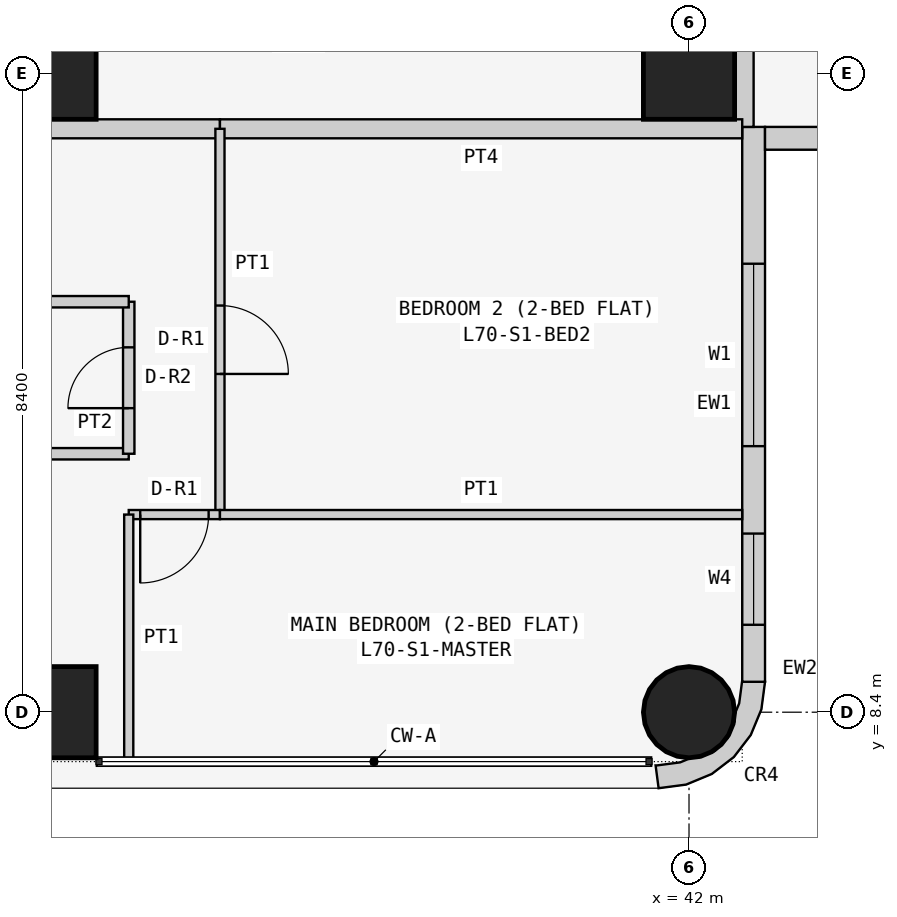
"""IFC4 building model, lengths in metres.
Left out: names, types, materials, properties, quantities, classifications, styles, units other than length and angle.
Written with IfcOpenShell. Run it as: python <this file> out.ifc"""

import sys

from ifc_helpers import new_model, si_unit, direction, frame, frame_2d, origin, origin_2d, place, context, subcontext, project, spatial, polyline, rectangle, circle, outline, extrude, element, fill, save


model = new_model("IFC4")
c1 = context("Model", 3, precision=1e-05, world=origin(), true_north=direction((0.0, 1.0)))
c2 = subcontext(c1, "Body", "Model", "MODEL_VIEW")
j1 = project(units=[si_unit("LENGTHUNIT", "METRE"), si_unit("PLANEANGLEUNIT", "RADIAN")], contexts=[c1])
p1 = place(None, origin())
s1 = spatial("IfcSite", under=j1, at=p1, CompositionType="ELEMENT")
p2 = place(p1, origin())
s2 = spatial("IfcBuilding", under=s1, at=p2, CompositionType="ELEMENT")
p3 = place(p2, frame((0.0, 0.0, 268.5)))
s3 = spatial("IfcBuildingStorey", under=s2, at=p3, CompositionType="ELEMENT", Elevation=268.5)
for number, where, z_axis, x_axis in (
    (1, (33.6, 8.4, 0.0), (0.0, 0.0, 1.0), (1.0, 0.0, 0.0)),
    (2, (33.6, 16.8, 0.0), (0.0, 0.0, 1.0), (1.0, 0.0, 0.0)),
):
    element("IfcColumn", number, at=place(p3, frame(where, z_axis=z_axis, x_axis=x_axis)), inside=s3, PredefinedType="COLUMN", context=c2, shape_type="SweptSolid", body=[
        extrude(rectangle(XDim=1.2, YDim=1.2, at=origin_2d()), origin(), (0.0, 0.0, 1.0), 3.6),
    ])
p4 = place(p3, frame((42.0, 8.4, 0.0), z_axis=(0.0, 0.0, 1.0), x_axis=(1.0, 0.0, 0.0)))
e3 = element("IfcColumn", 3, at=p4, inside=s3, PredefinedType="COLUMN", context=c2, shape_type="SweptSolid", body=[
    extrude(circle(Radius=0.6, at=origin_2d()), origin(), (0.0, 0.0, 1.0), 3.6),
])
p5 = place(p3, frame((42.0, 16.8, 0.0), z_axis=(0.0, 0.0, 1.0), x_axis=(1.0, 0.0, 0.0)))
e4 = element("IfcColumn", 4, at=p5, inside=s3, PredefinedType="COLUMN", context=c2, shape_type="SweptSolid", body=[
    extrude(rectangle(XDim=1.2, YDim=1.2, at=origin_2d()), origin(), (0.0, 0.0, 1.0), 3.6),
])
p6 = place(p3, frame((42.85, 8.8, 0.0), z_axis=(0.0, 0.0, 1.0), x_axis=(0.0, 1.0, 0.0)))
e5 = element("IfcWall", 5, at=p6, inside=s3, PredefinedType="SOLIDWALL", context=c2, shape_type="SweptSolid", body=[
    extrude(rectangle(XDim=7.3, YDim=0.3, at=frame_2d((3.65, 0.0))), origin(), (0.0, 0.0, 1.0), 3.45),
])
p7 = place(p6, frame((3.1, 0.0, 0.9)))
e6 = element("IfcOpeningElement", 6, at=p7, cuts=e5, PredefinedType="OPENING", context=c2, shape_type="SweptSolid", body=[
    extrude(rectangle(XDim=2.4, YDim=1.5, at=frame_2d((1.2, 0.75))), frame((0.0, 0.16, 0.0), z_axis=(0.0, -1.0, 0.0), x_axis=(1.0, 0.0, 0.0)), (0.0, 0.0, 1.0), 0.32),
])
p8 = place(p6, frame((0.75, 0.0, 0.9)))
e7 = element("IfcOpeningElement", 7, at=p8, cuts=e5, PredefinedType="OPENING", context=c2, shape_type="SweptSolid", body=[
    extrude(rectangle(XDim=1.2, YDim=1.5, at=frame_2d((0.6, 0.75))), frame((0.0, 0.16, 0.0), z_axis=(0.0, -1.0, 0.0), x_axis=(1.0, 0.0, 0.0)), (0.0, 0.0, 1.0), 0.32),
])
p9 = place(p3, frame((43.0, 15.95, 0.0), z_axis=(0.0, 0.0, 1.0), x_axis=(1.0, 0.0, 0.0)))
e8 = element("IfcWall", 8, at=p9, inside=s3, PredefinedType="SOLIDWALL", context=c2, shape_type="SweptSolid", body=[
    extrude(rectangle(XDim=7.0, YDim=0.3, at=frame_2d((3.5, 0.0))), origin(), (0.0, 0.0, 1.0), 3.45),
])
p10 = place(p9, frame((1.5, 0.0, 0.9)))
e9 = element("IfcOpeningElement", 9, at=p10, cuts=e8, PredefinedType="OPENING", context=c2, shape_type="SweptSolid", body=[
    extrude(rectangle(XDim=2.4, YDim=1.5, at=frame_2d((1.2, 0.75))), frame((0.0, 0.16, 0.0), z_axis=(0.0, -1.0, 0.0), x_axis=(1.0, 0.0, 0.0)), (0.0, 0.0, 1.0), 0.32),
])
p11 = place(p9, frame((5.05, 0.0, 0.9)))
e10 = element("IfcOpeningElement", 10, at=p11, cuts=e8, PredefinedType="OPENING", context=c2, shape_type="SweptSolid", body=[
    extrude(rectangle(XDim=1.2, YDim=1.5, at=frame_2d((0.6, 0.75))), frame((0.0, 0.16, 0.0), z_axis=(0.0, -1.0, 0.0), x_axis=(1.0, 0.0, 0.0)), (0.0, 0.0, 1.0), 0.32),
])
p12 = place(p3, frame((41.638, 7.824, 0.0), z_axis=(0.0, 0.0, 1.0), x_axis=(0.707106781187, -0.707106781187, 0.0)))
e11 = element("IfcWall", 11, at=p12, inside=s3, PredefinedType="SOLIDWALL", context=c2, shape_type="SweptSolid", body=[
    extrude(outline(polyline([(0.033, 1.469), (0.047, 1.455), (0.233, 1.212), (0.292, 1.069), (0.358, 1.003), (0.449, 0.782), (0.449, 0.543), (0.358, 0.322), (0.292, 0.257), (0.233, 0.114), (0.047, -0.129), (0.033, -0.143), (0.273, -0.327), (0.495, -0.037), (0.635, 0.301), (0.683, 0.663), (0.635, 1.025), (0.495, 1.363), (0.273, 1.653), (0.033, 1.469)])), origin(), (0.0, 0.0, 1.0), 3.45),
])
p13 = place(p3, frame((42.725, 22.971, 0.0), z_axis=(0.0, 0.0, 1.0), x_axis=(0.0, -1.0, 0.0)))
e12 = element("IfcWall", 12, at=p13, inside=s3, PredefinedType="PARTITIONING", context=c2, shape_type="SweptSolid", body=[
    extrude(rectangle(XDim=6.871, YDim=0.25, at=frame_2d((3.436, 0.0))), origin(), (0.0, 0.0, 1.0), 3.45),
])
p14 = place(p3, frame((35.829, 16.075, 0.0), z_axis=(0.0, 0.0, 1.0), x_axis=(-1.0, 0.0, 0.0)))
e13 = element("IfcWall", 13, at=p14, inside=s3, PredefinedType="PARTITIONING", context=c2, shape_type="SweptSolid", body=[
    extrude(rectangle(XDim=6.429, YDim=0.25, at=frame_2d((3.215, 0.0))), origin(), (0.0, 0.0, 1.0), 3.45),
])
p15 = place(p14, frame((4.929, 0.0, 0.0)))
e14 = element("IfcOpeningElement", 14, at=p15, cuts=e13, PredefinedType="OPENING", context=c2, shape_type="SweptSolid", body=[
    extrude(rectangle(XDim=1.0, YDim=2.1, at=frame_2d((0.5, 1.05))), frame((0.0, 0.135, 0.0), z_axis=(0.0, -1.0, 0.0), x_axis=(1.0, 0.0, 0.0)), (0.0, 0.0, 1.0), 0.27),
])
p16 = place(p3, frame((42.7, 16.075, 0.0), z_axis=(0.0, 0.0, 1.0), x_axis=(-1.0, 0.0, 0.0)))
e15 = element("IfcWall", 15, at=p16, inside=s3, PredefinedType="PARTITIONING", context=c2, shape_type="SweptSolid", body=[
    extrude(rectangle(XDim=6.871, YDim=0.25, at=frame_2d((3.436, 0.0))), origin(), (0.0, 0.0, 1.0), 3.45),
])
p17 = place(p3, frame((29.4, 11.8, 0.0), z_axis=(0.0, 0.0, 1.0), x_axis=(1.0, 0.0, 0.0)))
e16 = element("IfcWall", 16, at=p17, inside=s3, PredefinedType="PARTITIONING", context=c2, shape_type="SweptSolid", body=[
    extrude(rectangle(XDim=5.229, YDim=0.15, at=frame_2d((2.615, 0.0))), origin(), (0.0, 0.0, 1.0), 3.45),
])
p18 = place(p3, frame((34.629, 11.8, 0.0), z_axis=(0.0, 0.0, 1.0), x_axis=(0.0, 1.0, 0.0)))
e17 = element("IfcWall", 17, at=p18, inside=s3, PredefinedType="PARTITIONING", context=c2, shape_type="SweptSolid", body=[
    extrude(rectangle(XDim=2.0, YDim=0.15, at=frame_2d((1.0, 0.0))), origin(), (0.0, 0.0, 1.0), 3.45),
])
p19 = place(p18, frame((0.6, 0.0, 0.0)))
e18 = element("IfcOpeningElement", 18, at=p19, cuts=e17, PredefinedType="OPENING", context=c2, shape_type="SweptSolid", body=[
    extrude(rectangle(XDim=0.8, YDim=2.1, at=frame_2d((0.4, 1.05))), frame((0.0, 0.085, 0.0), z_axis=(0.0, -1.0, 0.0), x_axis=(1.0, 0.0, 0.0)), (0.0, 0.0, 1.0), 0.17),
])
p20 = place(p3, frame((34.629, 13.8, 0.0), z_axis=(0.0, 0.0, 1.0), x_axis=(-1.0, 0.0, 0.0)))
e19 = element("IfcWall", 19, at=p20, inside=s3, PredefinedType="PARTITIONING", context=c2, shape_type="SweptSolid", body=[
    extrude(rectangle(XDim=5.229, YDim=0.15, at=frame_2d((2.615, 0.0))), origin(), (0.0, 0.0, 1.0), 3.45),
])
p21 = place(p3, frame((35.829, 16.075, 0.0), z_axis=(0.0, 0.0, 1.0), x_axis=(0.0, -1.0, 0.0)))
e20 = element("IfcWall", 20, at=p21, inside=s3, PredefinedType="PARTITIONING", context=c2, shape_type="SweptSolid", body=[
    extrude(rectangle(XDim=5.075, YDim=0.12, at=frame_2d((2.538, 0.0))), origin(), (0.0, 0.0, 1.0), 3.45),
])
p22 = place(p21, frame((2.325, 0.0, 0.0)))
e21 = element("IfcOpeningElement", 21, at=p22, cuts=e20, PredefinedType="OPENING", context=c2, shape_type="SweptSolid", body=[
    extrude(rectangle(XDim=0.9, YDim=2.1, at=frame_2d((0.45, 1.05))), frame((0.0, 0.07, 0.0), z_axis=(0.0, -1.0, 0.0), x_axis=(1.0, 0.0, 0.0)), (0.0, 0.0, 1.0), 0.14),
])
p23 = place(p3, frame((35.829, 11.0, 0.0), z_axis=(0.0, 0.0, 1.0), x_axis=(-1.0, 0.0, 0.0)))
e22 = element("IfcWall", 22, at=p23, inside=s3, PredefinedType="PARTITIONING", context=c2, shape_type="SweptSolid", body=[
    extrude(rectangle(XDim=1.2, YDim=0.12, at=frame_2d((0.6, 0.0))), origin(), (0.0, 0.0, 1.0), 3.45),
])
p24 = place(p23, frame((0.149, 0.0, 0.0)))
e23 = element("IfcOpeningElement", 23, at=p24, cuts=e22, PredefinedType="OPENING", context=c2, shape_type="SweptSolid", body=[
    extrude(rectangle(XDim=0.9, YDim=2.1, at=frame_2d((0.45, 1.05))), frame((0.0, 0.07, 0.0), z_axis=(0.0, -1.0, 0.0), x_axis=(1.0, 0.0, 0.0)), (0.0, 0.0, 1.0), 0.14),
])
p25 = place(p3, frame((34.629, 11.0, 0.0), z_axis=(0.0, 0.0, 1.0), x_axis=(0.0, -1.0, 0.0)))
e24 = element("IfcWall", 24, at=p25, inside=s3, PredefinedType="PARTITIONING", context=c2, shape_type="SweptSolid", body=[
    extrude(rectangle(XDim=3.25, YDim=0.12, at=frame_2d((1.625, 0.0))), origin(), (0.0, 0.0, 1.0), 3.45),
])
p26 = place(p3, frame((35.829, 11.0, 0.0), z_axis=(0.0, 0.0, 1.0), x_axis=(1.0, 0.0, 0.0)))
e25 = element("IfcWall", 25, at=p26, inside=s3, PredefinedType="PARTITIONING", context=c2, shape_type="SweptSolid", body=[
    extrude(rectangle(XDim=6.871, YDim=0.12, at=frame_2d((3.436, 0.0))), origin(), (0.0, 0.0, 1.0), 3.45),
])
p27 = place(p7, origin())
e26 = element("IfcWindow", 26, at=p27, inside=s3, PartitioningType="SINGLE_PANEL", PredefinedType="WINDOW", context=c2, shape_type="SweptSolid", body=[
    extrude(rectangle(XDim=2.4, YDim=1.5, at=frame_2d((1.2, 0.75))), frame((0.0, 0.03, 0.0), z_axis=(0.0, -1.0, 0.0), x_axis=(1.0, 0.0, 0.0)), (0.0, 0.0, 1.0), 0.06),
])
fill(e6, e26)
p28 = place(p8, origin())
e27 = element("IfcWindow", 27, at=p28, inside=s3, PartitioningType="SINGLE_PANEL", PredefinedType="WINDOW", context=c2, shape_type="SweptSolid", body=[
    extrude(rectangle(XDim=1.2, YDim=1.5, at=frame_2d((0.6, 0.75))), frame((0.0, 0.03, 0.0), z_axis=(0.0, -1.0, 0.0), x_axis=(1.0, 0.0, 0.0)), (0.0, 0.0, 1.0), 0.06),
])
fill(e7, e27)
p29 = place(p19, origin())
e28 = element("IfcDoor", 28, at=p29, inside=s3, OperationType="SINGLE_SWING_LEFT", PredefinedType="DOOR", context=c2, shape_type="SweptSolid", body=[
    extrude(rectangle(XDim=0.8, YDim=2.1, at=frame_2d((0.4, 1.05))), frame((0.0, 0.025, 0.0), z_axis=(0.0, -1.0, 0.0), x_axis=(1.0, 0.0, 0.0)), (0.0, 0.0, 1.0), 0.05),
])
fill(e18, e28)
p30 = place(p22, origin())
e29 = element("IfcDoor", 29, at=p30, inside=s3, OperationType="SINGLE_SWING_RIGHT", PredefinedType="DOOR", context=c2, shape_type="SweptSolid", body=[
    extrude(rectangle(XDim=0.9, YDim=2.1, at=frame_2d((0.45, 1.05))), frame((0.0, 0.025, 0.0), z_axis=(0.0, -1.0, 0.0), x_axis=(1.0, 0.0, 0.0)), (0.0, 0.0, 1.0), 0.05),
])
fill(e21, e29)
p31 = place(p24, origin())
e30 = element("IfcDoor", 30, at=p31, inside=s3, OperationType="SINGLE_SWING_RIGHT", PredefinedType="DOOR", context=c2, shape_type="SweptSolid", body=[
    extrude(rectangle(XDim=0.9, YDim=2.1, at=frame_2d((0.45, 1.05))), frame((0.0, 0.025, 0.0), z_axis=(0.0, -1.0, 0.0), x_axis=(1.0, 0.0, 0.0)), (0.0, 0.0, 1.0), 0.05),
])
fill(e23, e30)
save(model, sys.argv[1])
